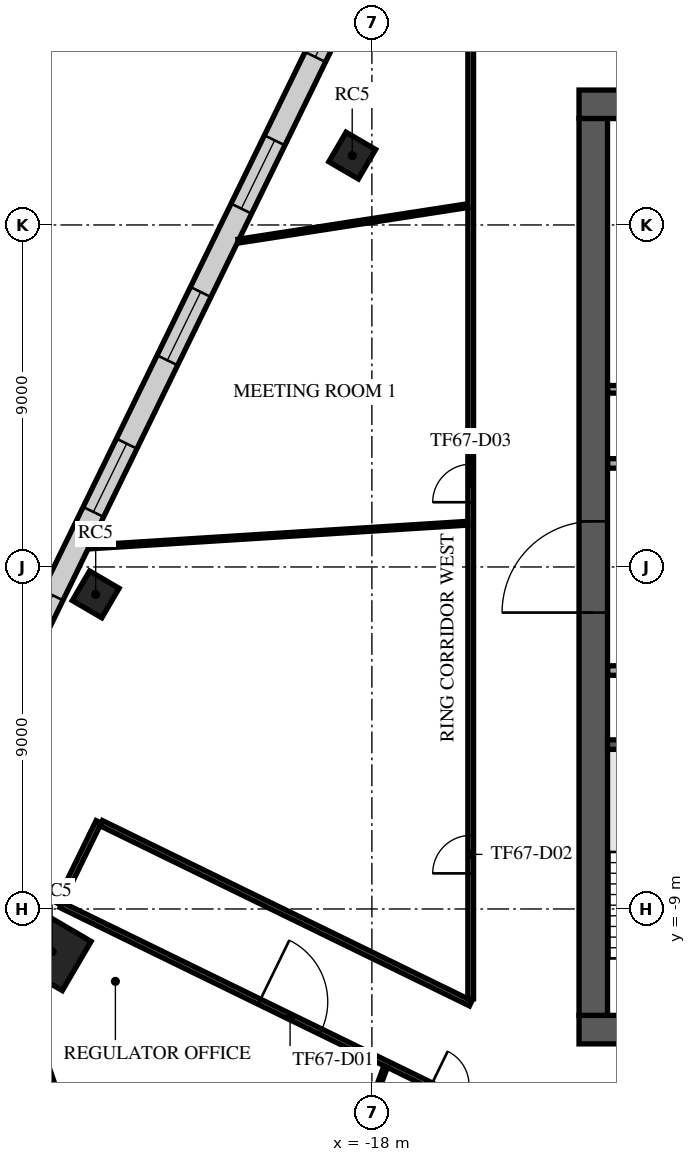
"""IFC4 building model, lengths in metres.
Left out: names, types, materials, properties, quantities, classifications, styles, units other than length and angle.
Written with IfcOpenShell. Run it as: python <this file> out.ifc"""

import sys

from ifc_helpers import new_model, si_unit, direction, frame, frame_2d, origin, origin_2d, place, context, subcontext, project, spatial, rectangle, extrude, element, fill, save


model = new_model("IFC4")
c1 = context("Model", 3, precision=1e-05, world=origin(), true_north=direction((0.0, 1.0)))
c2 = subcontext(c1, "Body", "Model", "MODEL_VIEW")
j1 = project(units=[si_unit("LENGTHUNIT", "METRE"), si_unit("PLANEANGLEUNIT", "RADIAN")], contexts=[c1])
p1 = place(None, origin())
s1 = spatial("IfcSite", under=j1, at=p1, CompositionType="ELEMENT")
p2 = place(p1, origin())
s2 = spatial("IfcBuilding", under=s1, at=p2, CompositionType="ELEMENT")
p3 = place(p2, frame((0.0, 0.0, 282.9)))
s3 = spatial("IfcBuildingStorey", under=s2, at=p3, CompositionType="ELEMENT", Elevation=282.9)
for number, where, z_axis, x_axis in (
    (1, (-18.518, 10.825, 0.0), (0.0, 0.0, 1.0), (0.505, 0.863, 0.0)),
    (2, (-25.268, -0.722, 0.0), (0.0, 0.0, 1.0), (0.505, 0.863, 0.0)),
):
    element("IfcColumn", number, at=place(p3, frame(where, z_axis=z_axis, x_axis=x_axis)), inside=s3, PredefinedType="COLUMN", context=c2, shape_type="SweptSolid", body=[
        extrude(rectangle(XDim=0.9, YDim=0.9, at=origin_2d()), origin(), (0.0, 0.0, 1.0), 4.0),
    ])
p4 = place(p3, frame((-26.415, -10.122, 0.0), z_axis=(0.0, 0.0, 1.0), x_axis=(0.504643651291, 0.863327739165, 0.0)))
e3 = element("IfcColumn", 3, at=p4, inside=s3, PredefinedType="COLUMN", context=c2, shape_type="SweptSolid", body=[
    extrude(rectangle(XDim=1.5, YDim=1.5, at=origin_2d()), origin(), (0.0, 0.0, 1.0), 4.0),
])
p5 = place(p3, frame((-12.55, 12.175, 0.0), z_axis=(0.0, 0.0, 1.0), x_axis=(1.0, 0.0, 0.0)))
e4 = element("IfcWall", 4, at=p5, inside=s3, PredefinedType="SHEAR", context=c2, shape_type="SweptSolid", body=[
    extrude(rectangle(XDim=25.1, YDim=0.75, at=frame_2d((12.55, 0.0))), origin(), (0.0, 0.0, 1.0), 3.64),
])
p6 = place(p5, frame((11.35, 0.0, 0.0)))
e5 = element("IfcOpeningElement", 5, at=p6, cuts=e4, PredefinedType="OPENING", context=c2, shape_type="SweptSolid", body=[
    extrude(rectangle(XDim=2.4, YDim=2.4, at=frame_2d((1.2, 1.2))), frame((0.0, 0.385, 0.0), z_axis=(0.0, -1.0, 0.0), x_axis=(1.0, 0.0, 0.0)), (0.0, 0.0, 1.0), 0.77),
])
p7 = place(p5, frame((22.175, 0.0, 0.0)))
e6 = element("IfcOpeningElement", 6, at=p7, cuts=e4, PredefinedType="OPENING", context=c2, shape_type="SweptSolid", body=[
    extrude(rectangle(XDim=1.2, YDim=2.1, at=frame_2d((0.6, 1.05))), frame((0.0, 0.385, 0.0), z_axis=(0.0, -1.0, 0.0), x_axis=(1.0, 0.0, 0.0)), (0.0, 0.0, 1.0), 0.77),
])
p8 = place(p5, frame((1.15, 0.0, 0.0)))
e7 = element("IfcOpeningElement", 7, at=p8, cuts=e4, PredefinedType="OPENING", context=c2, shape_type="SweptSolid", body=[
    extrude(rectangle(XDim=1.0, YDim=2.1, at=frame_2d((0.5, 1.05))), frame((0.0, 0.385, 0.0), z_axis=(0.0, -1.0, 0.0), x_axis=(1.0, 0.0, 0.0)), (0.0, 0.0, 1.0), 0.77),
])
p9 = place(p3, frame((-12.55, -12.175, 0.0), z_axis=(0.0, 0.0, 1.0), x_axis=(1.0, 0.0, 0.0)))
e8 = element("IfcWall", 8, at=p9, inside=s3, PredefinedType="SHEAR", context=c2, shape_type="SweptSolid", body=[
    extrude(rectangle(XDim=25.1, YDim=0.75, at=frame_2d((12.55, 0.0))), origin(), (0.0, 0.0, 1.0), 3.64),
])
p10 = place(p9, frame((7.45, 0.0, 0.0)))
e9 = element("IfcOpeningElement", 9, at=p10, cuts=e8, PredefinedType="OPENING", context=c2, shape_type="SweptSolid", body=[
    extrude(rectangle(XDim=2.0, YDim=2.1, at=frame_2d((1.0, 1.05))), frame((0.0, 0.385, 0.0), z_axis=(0.0, -1.0, 0.0), x_axis=(1.0, 0.0, 0.0)), (0.0, 0.0, 1.0), 0.77),
])
p11 = place(p9, frame((17.575, 0.0, 0.0)))
e10 = element("IfcOpeningElement", 10, at=p11, cuts=e8, PredefinedType="OPENING", context=c2, shape_type="SweptSolid", body=[
    extrude(rectangle(XDim=1.2, YDim=2.1, at=frame_2d((0.6, 1.05))), frame((0.0, 0.385, 0.0), z_axis=(0.0, -1.0, 0.0), x_axis=(1.0, 0.0, 0.0)), (0.0, 0.0, 1.0), 0.77),
])
p12 = place(p9, frame((1.725, 0.0, 0.0)))
e11 = element("IfcOpeningElement", 11, at=p12, cuts=e8, PredefinedType="OPENING", context=c2, shape_type="SweptSolid", body=[
    extrude(rectangle(XDim=1.2, YDim=2.1, at=frame_2d((0.6, 1.05))), frame((0.0, 0.385, 0.0), z_axis=(0.0, -1.0, 0.0), x_axis=(1.0, 0.0, 0.0)), (0.0, 0.0, 1.0), 0.77),
])
p13 = place(p9, frame((22.175, 0.0, 0.0)))
e12 = element("IfcOpeningElement", 12, at=p13, cuts=e8, PredefinedType="OPENING", context=c2, shape_type="SweptSolid", body=[
    extrude(rectangle(XDim=1.2, YDim=2.1, at=frame_2d((0.6, 1.05))), frame((0.0, 0.385, 0.0), z_axis=(0.0, -1.0, 0.0), x_axis=(1.0, 0.0, 0.0)), (0.0, 0.0, 1.0), 0.77),
])
p14 = place(p3, frame((-12.175, -11.8, 0.0), z_axis=(0.0, 0.0, 1.0), x_axis=(0.0, 1.0, 0.0)))
e13 = element("IfcWall", 13, at=p14, inside=s3, PredefinedType="SHEAR", context=c2, shape_type="SweptSolid", body=[
    extrude(rectangle(XDim=23.6, YDim=0.75, at=frame_2d((11.8, 0.0))), origin(), (0.0, 0.0, 1.0), 3.64),
])
p15 = place(p14, frame((10.6, 0.0, 0.0)))
e14 = element("IfcOpeningElement", 14, at=p15, cuts=e13, PredefinedType="OPENING", context=c2, shape_type="SweptSolid", body=[
    extrude(rectangle(XDim=2.4, YDim=2.4, at=frame_2d((1.2, 1.2))), frame((0.0, 0.385, 0.0), z_axis=(0.0, -1.0, 0.0), x_axis=(1.0, 0.0, 0.0)), (0.0, 0.0, 1.0), 0.77),
])
p16 = place(p3, frame((-8.65, -4.675, 0.0), z_axis=(0.0, 0.0, 1.0), x_axis=(-1.0, 0.0, 0.0)))
e15 = element("IfcWall", 15, at=p16, inside=s3, PredefinedType="SOLIDWALL", context=c2, shape_type="SweptSolid", body=[
    extrude(rectangle(XDim=3.15, YDim=0.25, at=frame_2d((1.575, 0.0))), origin(), (0.0, 0.0, 1.0), 3.64),
])
p17 = place(p3, frame((-11.795, -2.725, 0.0), z_axis=(0.0, 0.0, 1.0), x_axis=(1.0, 0.0, 0.0)))
e16 = element("IfcWall", 16, at=p17, inside=s3, PredefinedType="PARTITIONING", context=c2, shape_type="SweptSolid", body=[
    extrude(rectangle(XDim=14.415, YDim=0.25, at=frame_2d((7.208, 0.0))), origin(), (0.0, 0.0, 1.0), 3.64),
])
p18 = place(p17, frame((1.295, 0.0, 0.0)))
e17 = element("IfcOpeningElement", 17, at=p18, cuts=e16, PredefinedType="OPENING", context=c2, shape_type="SweptSolid", body=[
    extrude(rectangle(XDim=1.0, YDim=2.1, at=frame_2d((0.5, 1.05))), frame((0.0, 0.135, 0.0), z_axis=(0.0, -1.0, 0.0), x_axis=(1.0, 0.0, 0.0)), (0.0, 0.0, 1.0), 0.27),
])
p19 = place(p17, frame((4.42, 0.0, 0.0)))
e18 = element("IfcOpeningElement", 18, at=p19, cuts=e16, PredefinedType="OPENING", context=c2, shape_type="SweptSolid", body=[
    extrude(rectangle(XDim=1.0, YDim=2.1, at=frame_2d((0.5, 1.05))), frame((0.0, 0.135, 0.0), z_axis=(0.0, -1.0, 0.0), x_axis=(1.0, 0.0, 0.0)), (0.0, 0.0, 1.0), 0.27),
])
p20 = place(p17, frame((9.92, 0.0, 0.0)))
e19 = element("IfcOpeningElement", 19, at=p20, cuts=e16, PredefinedType="OPENING", context=c2, shape_type="SweptSolid", body=[
    extrude(rectangle(XDim=1.0, YDim=2.1, at=frame_2d((0.5, 1.05))), frame((0.0, 0.135, 0.0), z_axis=(0.0, -1.0, 0.0), x_axis=(1.0, 0.0, 0.0)), (0.0, 0.0, 1.0), 0.27),
])
p21 = place(p3, frame((-11.795, 2.725, 0.0), z_axis=(0.0, 0.0, 1.0), x_axis=(1.0, 0.0, 0.0)))
e20 = element("IfcWall", 20, at=p21, inside=s3, PredefinedType="PARTITIONING", context=c2, shape_type="SweptSolid", body=[
    extrude(rectangle(XDim=23.59, YDim=0.25, at=frame_2d((11.795, 0.0))), origin(), (0.0, 0.0, 1.0), 3.64),
])
p22 = place(p21, frame((21.345, 0.0, 0.0)))
e21 = element("IfcOpeningElement", 21, at=p22, cuts=e20, PredefinedType="OPENING", context=c2, shape_type="SweptSolid", body=[
    extrude(rectangle(XDim=0.9, YDim=2.1, at=frame_2d((0.45, 1.05))), frame((0.0, 0.135, 0.0), z_axis=(0.0, -1.0, 0.0), x_axis=(1.0, 0.0, 0.0)), (0.0, 0.0, 1.0), 0.27),
])
p23 = place(p21, frame((1.345, 0.0, 0.0)))
e22 = element("IfcOpeningElement", 22, at=p23, cuts=e20, PredefinedType="OPENING", context=c2, shape_type="SweptSolid", body=[
    extrude(rectangle(XDim=0.9, YDim=2.1, at=frame_2d((0.45, 1.05))), frame((0.0, 0.135, 0.0), z_axis=(0.0, -1.0, 0.0), x_axis=(1.0, 0.0, 0.0)), (0.0, 0.0, 1.0), 0.27),
])
p24 = place(p21, frame((4.42, 0.0, 0.0)))
e23 = element("IfcOpeningElement", 23, at=p24, cuts=e20, PredefinedType="OPENING", context=c2, shape_type="SweptSolid", body=[
    extrude(rectangle(XDim=1.0, YDim=2.1, at=frame_2d((0.5, 1.05))), frame((0.0, 0.135, 0.0), z_axis=(0.0, -1.0, 0.0), x_axis=(1.0, 0.0, 0.0)), (0.0, 0.0, 1.0), 0.27),
])
p25 = place(p21, frame((7.17, 0.0, 0.0)))
e24 = element("IfcOpeningElement", 24, at=p25, cuts=e20, PredefinedType="OPENING", context=c2, shape_type="SweptSolid", body=[
    extrude(rectangle(XDim=1.0, YDim=2.1, at=frame_2d((0.5, 1.05))), frame((0.0, 0.135, 0.0), z_axis=(0.0, -1.0, 0.0), x_axis=(1.0, 0.0, 0.0)), (0.0, 0.0, 1.0), 0.27),
])
p26 = place(p21, frame((12.57, 0.0, 0.0)))
e25 = element("IfcOpeningElement", 25, at=p26, cuts=e20, PredefinedType="OPENING", context=c2, shape_type="SweptSolid", body=[
    extrude(rectangle(XDim=1.2, YDim=2.1, at=frame_2d((0.6, 1.05))), frame((0.0, 0.135, 0.0), z_axis=(0.0, -1.0, 0.0), x_axis=(1.0, 0.0, 0.0)), (0.0, 0.0, 1.0), 0.27),
])
p27 = place(p3, frame((-11.795, 4.675, 0.0), z_axis=(0.0, 0.0, 1.0), x_axis=(1.0, 0.0, 0.0)))
e26 = element("IfcWall", 26, at=p27, inside=s3, PredefinedType="PARTITIONING", context=c2, shape_type="SweptSolid", body=[
    extrude(rectangle(XDim=3.645, YDim=0.2, at=frame_2d((1.823, 0.0))), origin(), (0.0, 0.0, 1.0), 3.64),
])
p28 = place(p3, frame((-10.292, 32.278, 0.0), z_axis=(0.0, 0.0, 1.0), x_axis=(-0.438370550468, -0.898794337144, 0.0)))
e27 = element("IfcWall", 27, at=p28, inside=s3, PredefinedType="STANDARD", context=c2, shape_type="SweptSolid", body=[
    extrude(rectangle(XDim=48.843, YDim=0.6, at=frame_2d((24.421, 0.0))), origin(), (0.0, 0.0, 1.0), 3.64),
])
p29 = place(p28, frame((1.22, 0.0, 0.9)))
e28 = element("IfcOpeningElement", 28, at=p29, cuts=e27, PredefinedType="OPENING", context=c2, shape_type="SweptSolid", body=[
    extrude(rectangle(XDim=2.0, YDim=2.1, at=frame_2d((1.0, 1.05))), frame((0.0, 0.31, 0.0), z_axis=(0.0, -1.0, 0.0), x_axis=(1.0, 0.0, 0.0)), (0.0, 0.0, 1.0), 0.62),
])
p30 = place(p28, frame((5.66, 0.0, 0.9)))
e29 = element("IfcOpeningElement", 29, at=p30, cuts=e27, PredefinedType="OPENING", context=c2, shape_type="SweptSolid", body=[
    extrude(rectangle(XDim=2.0, YDim=2.1, at=frame_2d((1.0, 1.05))), frame((0.0, 0.31, 0.0), z_axis=(0.0, -1.0, 0.0), x_axis=(1.0, 0.0, 0.0)), (0.0, 0.0, 1.0), 0.62),
])
p31 = place(p28, frame((10.101, 0.0, 0.9)))
e30 = element("IfcOpeningElement", 30, at=p31, cuts=e27, PredefinedType="OPENING", context=c2, shape_type="SweptSolid", body=[
    extrude(rectangle(XDim=2.0, YDim=2.1, at=frame_2d((1.0, 1.05))), frame((0.0, 0.31, 0.0), z_axis=(0.0, -1.0, 0.0), x_axis=(1.0, 0.0, 0.0)), (0.0, 0.0, 1.0), 0.62),
])
p32 = place(p28, frame((14.541, 0.0, 0.9)))
e31 = element("IfcOpeningElement", 31, at=p32, cuts=e27, PredefinedType="OPENING", context=c2, shape_type="SweptSolid", body=[
    extrude(rectangle(XDim=2.0, YDim=2.1, at=frame_2d((1.0, 1.05))), frame((0.0, 0.31, 0.0), z_axis=(0.0, -1.0, 0.0), x_axis=(1.0, 0.0, 0.0)), (0.0, 0.0, 1.0), 0.62),
])
p33 = place(p28, frame((18.981, 0.0, 0.9)))
e32 = element("IfcOpeningElement", 32, at=p33, cuts=e27, PredefinedType="OPENING", context=c2, shape_type="SweptSolid", body=[
    extrude(rectangle(XDim=2.0, YDim=2.1, at=frame_2d((1.0, 1.05))), frame((0.0, 0.31, 0.0), z_axis=(0.0, -1.0, 0.0), x_axis=(1.0, 0.0, 0.0)), (0.0, 0.0, 1.0), 0.62),
])
p34 = place(p28, frame((23.422, 0.0, 0.9)))
e33 = element("IfcOpeningElement", 33, at=p34, cuts=e27, PredefinedType="OPENING", context=c2, shape_type="SweptSolid", body=[
    extrude(rectangle(XDim=2.0, YDim=2.1, at=frame_2d((1.0, 1.05))), frame((0.0, 0.31, 0.0), z_axis=(0.0, -1.0, 0.0), x_axis=(1.0, 0.0, 0.0)), (0.0, 0.0, 1.0), 0.62),
])
p35 = place(p28, frame((27.862, 0.0, 0.9)))
e34 = element("IfcOpeningElement", 34, at=p35, cuts=e27, PredefinedType="OPENING", context=c2, shape_type="SweptSolid", body=[
    extrude(rectangle(XDim=2.0, YDim=2.1, at=frame_2d((1.0, 1.05))), frame((0.0, 0.31, 0.0), z_axis=(0.0, -1.0, 0.0), x_axis=(1.0, 0.0, 0.0)), (0.0, 0.0, 1.0), 0.62),
])
p36 = place(p28, frame((32.302, 0.0, 0.9)))
e35 = element("IfcOpeningElement", 35, at=p36, cuts=e27, PredefinedType="OPENING", context=c2, shape_type="SweptSolid", body=[
    extrude(rectangle(XDim=2.0, YDim=2.1, at=frame_2d((1.0, 1.05))), frame((0.0, 0.31, 0.0), z_axis=(0.0, -1.0, 0.0), x_axis=(1.0, 0.0, 0.0)), (0.0, 0.0, 1.0), 0.62),
])
p37 = place(p28, frame((36.742, 0.0, 0.9)))
e36 = element("IfcOpeningElement", 36, at=p37, cuts=e27, PredefinedType="OPENING", context=c2, shape_type="SweptSolid", body=[
    extrude(rectangle(XDim=2.0, YDim=2.1, at=frame_2d((1.0, 1.05))), frame((0.0, 0.31, 0.0), z_axis=(0.0, -1.0, 0.0), x_axis=(1.0, 0.0, 0.0)), (0.0, 0.0, 1.0), 0.62),
])
p38 = place(p28, frame((41.183, 0.0, 0.9)))
e37 = element("IfcOpeningElement", 37, at=p38, cuts=e27, PredefinedType="OPENING", context=c2, shape_type="SweptSolid", body=[
    extrude(rectangle(XDim=2.0, YDim=2.1, at=frame_2d((1.0, 1.05))), frame((0.0, 0.31, 0.0), z_axis=(0.0, -1.0, 0.0), x_axis=(1.0, 0.0, 0.0)), (0.0, 0.0, 1.0), 0.62),
])
p39 = place(p28, frame((45.623, 0.0, 0.9)))
e38 = element("IfcOpeningElement", 38, at=p39, cuts=e27, PredefinedType="OPENING", context=c2, shape_type="SweptSolid", body=[
    extrude(rectangle(XDim=2.0, YDim=2.1, at=frame_2d((1.0, 1.05))), frame((0.0, 0.31, 0.0), z_axis=(0.0, -1.0, 0.0), x_axis=(1.0, 0.0, 0.0)), (0.0, 0.0, 1.0), 0.62),
])
p40 = place(p3, frame((-27.873, -10.079, 0.0), z_axis=(0.0, 0.0, 1.0), x_axis=(0.325569297229, -0.945518182111, 0.0)))
e39 = element("IfcWall", 39, at=p40, inside=s3, PredefinedType="STANDARD", context=c2, shape_type="SweptSolid", body=[
    extrude(rectangle(XDim=8.0, YDim=0.6, at=frame_2d((4.0, 0.0))), origin(), (0.0, 0.0, 1.0), 3.64),
])
p41 = place(p40, frame((1.2, 0.0, 0.9)))
e40 = element("IfcOpeningElement", 40, at=p41, cuts=e39, PredefinedType="OPENING", context=c2, shape_type="SweptSolid", body=[
    extrude(rectangle(XDim=1.6, YDim=2.1, at=frame_2d((0.8, 1.05))), frame((0.0, 0.31, 0.0), z_axis=(0.0, -1.0, 0.0), x_axis=(1.0, 0.0, 0.0)), (0.0, 0.0, 1.0), 0.62),
])
p42 = place(p40, frame((5.2, 0.0, 0.9)))
e41 = element("IfcOpeningElement", 41, at=p42, cuts=e39, PredefinedType="OPENING", context=c2, shape_type="SweptSolid", body=[
    extrude(rectangle(XDim=1.6, YDim=2.1, at=frame_2d((0.8, 1.05))), frame((0.0, 0.31, 0.0), z_axis=(0.0, -1.0, 0.0), x_axis=(1.0, 0.0, 0.0)), (0.0, 0.0, 1.0), 0.62),
])
p43 = place(p3, frame((-26.242, -8.865, 0.0), z_axis=(0.0, 0.0, 1.0), x_axis=(0.438361496965, 0.898798752769, 0.0)))
e42 = element("IfcWall", 42, at=p43, inside=s3, PredefinedType="PARTITIONING", context=c2, shape_type="SweptSolid", body=[
    extrude(rectangle(XDim=2.4, YDim=0.15, at=frame_2d((1.2, 0.0))), origin(), (0.0, 0.0, 1.0), 3.04),
])
p44 = place(p3, frame((-26.175, -8.898, 0.0), z_axis=(0.0, 0.0, 1.0), x_axis=(0.898795233888, -0.438368711864, 0.0)))
e43 = element("IfcWall", 43, at=p44, inside=s3, PredefinedType="PARTITIONING", context=c2, shape_type="SweptSolid", body=[
    extrude(rectangle(XDim=39.325, YDim=0.15, at=frame_2d((19.663, 0.0))), origin(), (0.0, 0.0, 1.0), 3.04),
])
p45 = place(p44, frame((5.8, 0.0, 0.0)))
e44 = element("IfcOpeningElement", 44, at=p45, cuts=e43, PredefinedType="OPENING", context=c2, shape_type="SweptSolid", body=[
    extrude(rectangle(XDim=1.8, YDim=2.1, at=frame_2d((0.9, 1.05))), frame((0.0, 0.085, 0.0), z_axis=(0.0, -1.0, 0.0), x_axis=(1.0, 0.0, 0.0)), (0.0, 0.0, 1.0), 0.17),
])
p46 = place(p44, frame((10.827, 0.0, 0.0)))
e45 = element("IfcOpeningElement", 45, at=p46, cuts=e43, PredefinedType="OPENING", context=c2, shape_type="SweptSolid", body=[
    extrude(rectangle(XDim=1.0, YDim=2.1, at=frame_2d((0.5, 1.05))), frame((0.0, 0.085, 0.0), z_axis=(0.0, -1.0, 0.0), x_axis=(1.0, 0.0, 0.0)), (0.0, 0.0, 1.0), 0.17),
])
p47 = place(p44, frame((23.556, 0.0, 0.0)))
e46 = element("IfcOpeningElement", 46, at=p47, cuts=e43, PredefinedType="OPENING", context=c2, shape_type="SweptSolid", body=[
    extrude(rectangle(XDim=1.0, YDim=2.1, at=frame_2d((0.5, 1.05))), frame((0.0, 0.085, 0.0), z_axis=(0.0, -1.0, 0.0), x_axis=(1.0, 0.0, 0.0)), (0.0, 0.0, 1.0), 0.17),
])
p48 = place(p3, frame((-25.123, -6.741, 0.0), z_axis=(0.0, 0.0, 1.0), x_axis=(0.898798159951, -0.438362712453, 0.0)))
e47 = element("IfcWall", 47, at=p48, inside=s3, PredefinedType="PARTITIONING", context=c2, shape_type="SweptSolid", body=[
    extrude(rectangle(XDim=10.817, YDim=0.15, at=frame_2d((5.409, 0.0))), origin(), (0.0, 0.0, 1.0), 3.24),
])
p49 = place(p3, frame((-15.4, -11.363, 0.0), z_axis=(0.0, 0.0, 1.0), x_axis=(0.0, 1.0, 0.0)))
e48 = element("IfcWall", 48, at=p49, inside=s3, PredefinedType="PARTITIONING", context=c2, shape_type="SweptSolid", body=[
    extrude(rectangle(XDim=26.763, YDim=0.15, at=frame_2d((13.381, 0.0))), origin(), (0.0, 0.0, 1.0), 3.24),
])
p50 = place(p49, frame((3.3, 0.0, 0.0)))
e49 = element("IfcOpeningElement", 49, at=p50, cuts=e48, PredefinedType="OPENING", context=c2, shape_type="SweptSolid", body=[
    extrude(rectangle(XDim=1.0, YDim=2.1, at=frame_2d((0.5, 1.05))), frame((0.0, 0.085, 0.0), z_axis=(0.0, -1.0, 0.0), x_axis=(1.0, 0.0, 0.0)), (0.0, 0.0, 1.0), 0.17),
])
p51 = place(p49, frame((13.067, 0.0, 0.0)))
e50 = element("IfcOpeningElement", 50, at=p51, cuts=e48, PredefinedType="OPENING", context=c2, shape_type="SweptSolid", body=[
    extrude(rectangle(XDim=1.0, YDim=2.1, at=frame_2d((0.5, 1.05))), frame((0.0, 0.085, 0.0), z_axis=(0.0, -1.0, 0.0), x_axis=(1.0, 0.0, 0.0)), (0.0, 0.0, 1.0), 0.17),
])
p52 = place(p3, frame((-25.443, 0.525, 0.0), z_axis=(0.0, 0.0, 1.0), x_axis=(0.998034171975, 0.062672095621, 0.0)))
e51 = element("IfcWall", 51, at=p52, inside=s3, PredefinedType="PARTITIONING", context=c2, shape_type="SweptSolid", body=[
    extrude(rectangle(XDim=9.984, YDim=0.1, at=frame_2d((4.992, 0.0))), origin(), (0.0, 0.0, 1.0), 3.04),
])
p53 = place(p3, frame((-21.517, 8.574, 0.0), z_axis=(0.0, 0.0, 1.0), x_axis=(0.988254925965, 0.152814270625, 0.0)))
e52 = element("IfcWall", 52, at=p53, inside=s3, PredefinedType="PARTITIONING", context=c2, shape_type="SweptSolid", body=[
    extrude(rectangle(XDim=6.106, YDim=0.1, at=frame_2d((3.053, 0.0))), origin(), (0.0, 0.0, 1.0), 3.04),
])
p54 = place(p3, frame((-21.051, -22.441, 0.0), z_axis=(0.0, 0.0, 1.0), x_axis=(0.344611208879, 0.938745500503, 0.0)))
e53 = element("IfcWall", 53, at=p54, inside=s3, PredefinedType="PARTITIONING", context=c2, shape_type="SweptSolid", body=[
    extrude(rectangle(XDim=9.898, YDim=0.1, at=frame_2d((4.949, 0.0))), origin(), (0.0, 0.0, 1.0), 3.04),
])
p55 = place(p15, origin())
e54 = element("IfcDoor", 54, at=p55, inside=s3, OperationType="SINGLE_SWING_LEFT", PredefinedType="DOOR", context=c2, shape_type="SweptSolid", body=[
    extrude(rectangle(XDim=2.4, YDim=2.4, at=frame_2d((1.2, 1.2))), frame((0.0, 0.025, 0.0), z_axis=(0.0, -1.0, 0.0), x_axis=(1.0, 0.0, 0.0)), (0.0, 0.0, 1.0), 0.05),
])
fill(e14, e54)
p56 = place(p33, origin())
e55 = element("IfcWindow", 55, at=p56, inside=s3, PartitioningType="SINGLE_PANEL", PredefinedType="WINDOW", context=c2, shape_type="SweptSolid", body=[
    extrude(rectangle(XDim=2.0, YDim=2.1, at=frame_2d((1.0, 1.05))), frame((0.0, 0.03, 0.0), z_axis=(0.0, -1.0, 0.0), x_axis=(1.0, 0.0, 0.0)), (0.0, 0.0, 1.0), 0.06),
])
fill(e32, e55)
p57 = place(p34, origin())
e56 = element("IfcWindow", 56, at=p57, inside=s3, PartitioningType="SINGLE_PANEL", PredefinedType="WINDOW", context=c2, shape_type="SweptSolid", body=[
    extrude(rectangle(XDim=2.0, YDim=2.1, at=frame_2d((1.0, 1.05))), frame((0.0, 0.03, 0.0), z_axis=(0.0, -1.0, 0.0), x_axis=(1.0, 0.0, 0.0)), (0.0, 0.0, 1.0), 0.06),
])
fill(e33, e56)
p58 = place(p35, origin())
e57 = element("IfcWindow", 57, at=p58, inside=s3, PartitioningType="SINGLE_PANEL", PredefinedType="WINDOW", context=c2, shape_type="SweptSolid", body=[
    extrude(rectangle(XDim=2.0, YDim=2.1, at=frame_2d((1.0, 1.05))), frame((0.0, 0.03, 0.0), z_axis=(0.0, -1.0, 0.0), x_axis=(1.0, 0.0, 0.0)), (0.0, 0.0, 1.0), 0.06),
])
fill(e34, e57)
p59 = place(p36, origin())
e58 = element("IfcWindow", 58, at=p59, inside=s3, PartitioningType="SINGLE_PANEL", PredefinedType="WINDOW", context=c2, shape_type="SweptSolid", body=[
    extrude(rectangle(XDim=2.0, YDim=2.1, at=frame_2d((1.0, 1.05))), frame((0.0, 0.03, 0.0), z_axis=(0.0, -1.0, 0.0), x_axis=(1.0, 0.0, 0.0)), (0.0, 0.0, 1.0), 0.06),
])
fill(e35, e58)
p60 = place(p37, origin())
e59 = element("IfcWindow", 59, at=p60, inside=s3, PartitioningType="SINGLE_PANEL", PredefinedType="WINDOW", context=c2, shape_type="SweptSolid", body=[
    extrude(rectangle(XDim=2.0, YDim=2.1, at=frame_2d((1.0, 1.05))), frame((0.0, 0.03, 0.0), z_axis=(0.0, -1.0, 0.0), x_axis=(1.0, 0.0, 0.0)), (0.0, 0.0, 1.0), 0.06),
])
fill(e36, e59)
p61 = place(p45, frame((1.8, 0.0, 0.0), z_axis=(0.0, 0.0, 1.0), x_axis=(-1.0, 0.0, 0.0)))
e60 = element("IfcDoor", 60, at=p61, inside=s3, OperationType="DOUBLE_DOOR_SINGLE_SWING", PredefinedType="DOOR", context=c2, shape_type="SweptSolid", body=[
    extrude(rectangle(XDim=1.8, YDim=2.1, at=frame_2d((0.9, 1.05))), frame((0.0, 0.025, 0.0), z_axis=(0.0, -1.0, 0.0), x_axis=(1.0, 0.0, 0.0)), (0.0, 0.0, 1.0), 0.05),
])
fill(e44, e60)
p62 = place(p50, origin())
e61 = element("IfcDoor", 61, at=p62, inside=s3, OperationType="SINGLE_SWING_LEFT", PredefinedType="DOOR", context=c2, shape_type="SweptSolid", body=[
    extrude(rectangle(XDim=1.0, YDim=2.1, at=frame_2d((0.5, 1.05))), frame((0.0, 0.025, 0.0), z_axis=(0.0, -1.0, 0.0), x_axis=(1.0, 0.0, 0.0)), (0.0, 0.0, 1.0), 0.05),
])
fill(e49, e61)
p63 = place(p51, origin())
e62 = element("IfcDoor", 62, at=p63, inside=s3, OperationType="SINGLE_SWING_LEFT", PredefinedType="DOOR", context=c2, shape_type="SweptSolid", body=[
    extrude(rectangle(XDim=1.0, YDim=2.1, at=frame_2d((0.5, 1.05))), frame((0.0, 0.025, 0.0), z_axis=(0.0, -1.0, 0.0), x_axis=(1.0, 0.0, 0.0)), (0.0, 0.0, 1.0), 0.05),
])
fill(e50, e62)
save(model, sys.argv[1])
